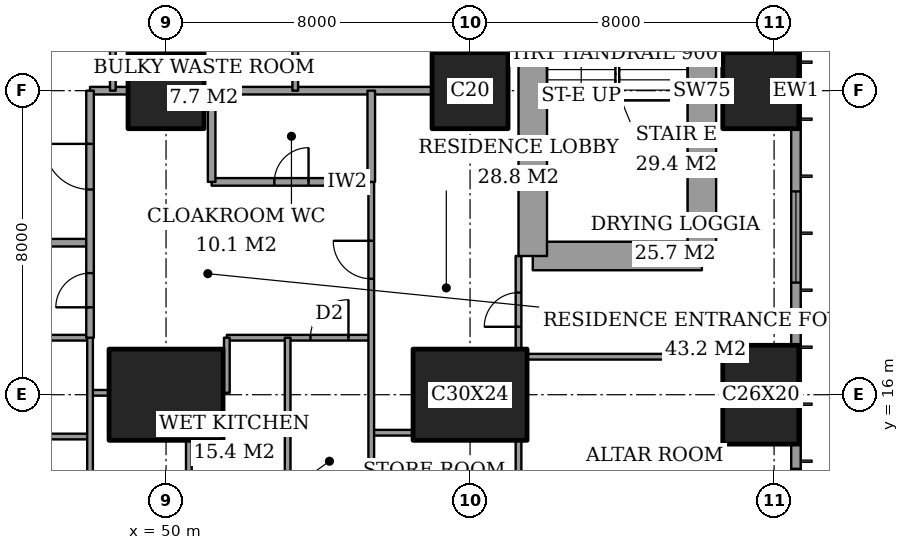
"""IFC4 building model, lengths in metres.
Left out: names, types, materials, properties, quantities, classifications, styles, units other than length and angle.
Written with IfcOpenShell. Run it as: python <this file> out.ifc"""

import sys

from ifc_helpers import new_model, si_unit, direction, frame, frame_2d, origin, origin_2d, place, context, subcontext, project, spatial, rectangle, extrude, element, fill, save


model = new_model("IFC4")
c1 = context("Model", 3, precision=1e-05, world=origin(), true_north=direction((0.0, 1.0)))
c2 = subcontext(c1, "Body", "Model", "MODEL_VIEW")
j1 = project(units=[si_unit("LENGTHUNIT", "METRE"), si_unit("PLANEANGLEUNIT", "RADIAN")], contexts=[c1])
p1 = place(None, origin())
s1 = spatial("IfcSite", under=j1, at=p1, CompositionType="ELEMENT")
p2 = place(p1, origin())
s2 = spatial("IfcBuilding", under=s1, at=p2, CompositionType="ELEMENT")
p3 = place(p2, frame((0.0, 0.0, 164.6)))
s3 = spatial("IfcBuildingStorey", under=s2, at=p3, CompositionType="ELEMENT", Elevation=164.6)
p4 = place(p3, frame((50.0, 16.0, 0.0), z_axis=(0.0, 0.0, 1.0), x_axis=(1.0, 0.0, 0.0)))
e1 = element("IfcColumn", 1, at=p4, inside=s3, PredefinedType="COLUMN", context=c2, shape_type="SweptSolid", body=[
    extrude(rectangle(XDim=3.0, YDim=2.4, at=origin_2d()), origin(), (0.0, 0.0, 1.0), 3.6),
])
p5 = place(p3, frame((50.0, 24.0, 0.0), z_axis=(0.0, 0.0, 1.0), x_axis=(1.0, 0.0, 0.0)))
e2 = element("IfcColumn", 2, at=p5, inside=s3, PredefinedType="COLUMN", context=c2, shape_type="SweptSolid", body=[
    extrude(rectangle(XDim=2.0, YDim=2.0, at=origin_2d()), origin(), (0.0, 0.0, 1.0), 3.6),
])
p6 = place(p3, frame((58.0, 16.0, 0.0), z_axis=(0.0, 0.0, 1.0), x_axis=(1.0, 0.0, 0.0)))
e3 = element("IfcColumn", 3, at=p6, inside=s3, PredefinedType="COLUMN", context=c2, shape_type="SweptSolid", body=[
    extrude(rectangle(XDim=3.0, YDim=2.4, at=origin_2d()), origin(), (0.0, 0.0, 1.0), 3.6),
])
p7 = place(p3, frame((58.0, 24.0, 0.0), z_axis=(0.0, 0.0, 1.0), x_axis=(1.0, 0.0, 0.0)))
e4 = element("IfcColumn", 4, at=p7, inside=s3, PredefinedType="COLUMN", context=c2, shape_type="SweptSolid", body=[
    extrude(rectangle(XDim=2.0, YDim=2.0, at=origin_2d()), origin(), (0.0, 0.0, 1.0), 3.6),
])
p8 = place(p3, frame((65.65, 16.0, 0.0), z_axis=(0.0, 0.0, 1.0), x_axis=(0.0, 1.0, 0.0)))
e5 = element("IfcColumn", 5, at=p8, inside=s3, PredefinedType="COLUMN", context=c2, shape_type="SweptSolid", body=[
    extrude(rectangle(XDim=2.6, YDim=2.0, at=origin_2d()), origin(), (0.0, 0.0, 1.0), 3.6),
])
p9 = place(p3, frame((65.65, 24.0, 0.0), z_axis=(0.0, 0.0, 1.0), x_axis=(1.0, 0.0, 0.0)))
e6 = element("IfcColumn", 6, at=p9, inside=s3, PredefinedType="COLUMN", context=c2, shape_type="SweptSolid", body=[
    extrude(rectangle(XDim=2.0, YDim=2.0, at=origin_2d()), origin(), (0.0, 0.0, 1.0), 3.6),
])
p10 = place(p3, frame((59.65, 19.65, 0.0), z_axis=(0.0, 0.0, 1.0), x_axis=(1.0, 0.0, 0.0)))
e7 = element("IfcWall", 7, at=p10, inside=s3, PredefinedType="SHEAR", context=c2, shape_type="SweptSolid", body=[
    extrude(rectangle(XDim=4.45, YDim=0.75, at=frame_2d((2.225, 0.0))), origin(), (0.0, 0.0, 1.0), 3.6),
])
p11 = place(p3, frame((64.1, 19.65, 0.0), z_axis=(0.0, 0.0, 1.0), x_axis=(0.0, 1.0, 0.0)))
e8 = element("IfcWall", 8, at=p11, inside=s3, PredefinedType="SHEAR", context=c2, shape_type="SweptSolid", body=[
    extrude(rectangle(XDim=8.7, YDim=0.75, at=frame_2d((4.35, 0.0))), origin(), (0.0, 0.0, 1.0), 3.6),
])
p12 = place(p3, frame((59.65, 28.35, 0.0), z_axis=(0.0, 0.0, 1.0), x_axis=(0.0, -1.0, 0.0)))
e9 = element("IfcWall", 9, at=p12, inside=s3, PredefinedType="SHEAR", context=c2, shape_type="SweptSolid", body=[
    extrude(rectangle(XDim=8.7, YDim=0.75, at=frame_2d((4.35, 0.0))), origin(), (0.0, 0.0, 1.0), 3.6),
])
p13 = place(p12, frame((0.975, 0.0, 0.0)))
e10 = element("IfcOpeningElement", 10, at=p13, cuts=e9, PredefinedType="OPENING", context=c2, shape_type="SweptSolid", body=[
    extrude(rectangle(XDim=1.0, YDim=2.1, at=frame_2d((0.5, 1.05))), frame((0.0, 0.385, 0.0), z_axis=(0.0, -1.0, 0.0), x_axis=(1.0, 0.0, 0.0)), (0.0, 0.0, 1.0), 0.77),
])
p14 = place(p3, frame((66.575, 3.175, 0.0), z_axis=(0.0, 0.0, 1.0), x_axis=(0.0, 1.0, 0.0)))
e11 = element("IfcWall", 11, at=p14, inside=s3, PredefinedType="SOLIDWALL", context=c2, shape_type="SweptSolid", body=[
    extrude(rectangle(XDim=41.65, YDim=0.25, at=frame_2d((20.825, 0.0))), origin(), (0.0, 0.0, 1.0), 3.6),
])
p15 = place(p14, frame((0.775, 0.0, 0.4)))
e12 = element("IfcOpeningElement", 12, at=p15, cuts=e11, PredefinedType="OPENING", context=c2, shape_type="SweptSolid", body=[
    extrude(rectangle(XDim=2.4, YDim=2.2, at=frame_2d((1.2, 1.1))), frame((0.0, 0.135, 0.0), z_axis=(0.0, -1.0, 0.0), x_axis=(1.0, 0.0, 0.0)), (0.0, 0.0, 1.0), 0.27),
])
p16 = place(p14, frame((6.225, 0.0, 0.4)))
e13 = element("IfcOpeningElement", 13, at=p16, cuts=e11, PredefinedType="OPENING", context=c2, shape_type="SweptSolid", body=[
    extrude(rectangle(XDim=1.2, YDim=2.2, at=frame_2d((0.6, 1.1))), frame((0.0, 0.135, 0.0), z_axis=(0.0, -1.0, 0.0), x_axis=(1.0, 0.0, 0.0)), (0.0, 0.0, 1.0), 0.27),
])
p17 = place(p14, frame((8.475, 0.0, 0.4)))
e14 = element("IfcOpeningElement", 14, at=p17, cuts=e11, PredefinedType="OPENING", context=c2, shape_type="SweptSolid", body=[
    extrude(rectangle(XDim=2.4, YDim=2.2, at=frame_2d((1.2, 1.1))), frame((0.0, 0.135, 0.0), z_axis=(0.0, -1.0, 0.0), x_axis=(1.0, 0.0, 0.0)), (0.0, 0.0, 1.0), 0.27),
])
p18 = place(p14, frame((15.775, 0.0, 0.4)))
e15 = element("IfcOpeningElement", 15, at=p18, cuts=e11, PredefinedType="OPENING", context=c2, shape_type="SweptSolid", body=[
    extrude(rectangle(XDim=2.4, YDim=2.2, at=frame_2d((1.2, 1.1))), frame((0.0, 0.135, 0.0), z_axis=(0.0, -1.0, 0.0), x_axis=(1.0, 0.0, 0.0)), (0.0, 0.0, 1.0), 0.27),
])
p19 = place(p14, frame((23.475, 0.0, 0.4)))
e16 = element("IfcOpeningElement", 16, at=p19, cuts=e11, PredefinedType="OPENING", context=c2, shape_type="SweptSolid", body=[
    extrude(rectangle(XDim=2.4, YDim=2.2, at=frame_2d((1.2, 1.1))), frame((0.0, 0.135, 0.0), z_axis=(0.0, -1.0, 0.0), x_axis=(1.0, 0.0, 0.0)), (0.0, 0.0, 1.0), 0.27),
])
p20 = place(p14, frame((30.975, 0.0, 0.4)))
e17 = element("IfcOpeningElement", 17, at=p20, cuts=e11, PredefinedType="OPENING", context=c2, shape_type="SweptSolid", body=[
    extrude(rectangle(XDim=2.4, YDim=2.2, at=frame_2d((1.2, 1.1))), frame((0.0, 0.135, 0.0), z_axis=(0.0, -1.0, 0.0), x_axis=(1.0, 0.0, 0.0)), (0.0, 0.0, 1.0), 0.27),
])
p21 = place(p14, frame((34.5, 0.0, 0.4)))
e18 = element("IfcOpeningElement", 18, at=p21, cuts=e11, PredefinedType="OPENING", context=c2, shape_type="SweptSolid", body=[
    extrude(rectangle(XDim=1.2, YDim=2.2, at=frame_2d((0.6, 1.1))), frame((0.0, 0.135, 0.0), z_axis=(0.0, -1.0, 0.0), x_axis=(1.0, 0.0, 0.0)), (0.0, 0.0, 1.0), 0.27),
])
p22 = place(p14, frame((38.475, 0.0, 0.4)))
e19 = element("IfcOpeningElement", 19, at=p22, cuts=e11, PredefinedType="OPENING", context=c2, shape_type="SweptSolid", body=[
    extrude(rectangle(XDim=2.4, YDim=2.2, at=frame_2d((1.2, 1.1))), frame((0.0, 0.135, 0.0), z_axis=(0.0, -1.0, 0.0), x_axis=(1.0, 0.0, 0.0)), (0.0, 0.0, 1.0), 0.27),
])
p23 = place(p3, frame((45.6, 14.9, 0.0), z_axis=(0.0, 0.0, 1.0), x_axis=(1.0, 0.0, 0.0)))
e20 = element("IfcWall", 20, at=p23, inside=s3, PredefinedType="PARTITIONING", context=c2, shape_type="SweptSolid", body=[
    extrude(rectangle(XDim=2.4, YDim=0.15, at=frame_2d((1.2, 0.0))), origin(), (0.0, 0.0, 1.0), 3.35),
])
p24 = place(p3, frame((55.4, 15.0, 0.0), z_axis=(0.0, 0.0, 1.0), x_axis=(1.0, 0.0, 0.0)))
e21 = element("IfcWall", 21, at=p24, inside=s3, PredefinedType="PARTITIONING", context=c2, shape_type="SweptSolid", body=[
    extrude(rectangle(XDim=1.1, YDim=0.15, at=frame_2d((0.55, 0.0))), origin(), (0.0, 0.0, 1.0), 3.35),
])
p25 = place(p3, frame((48.0, 16.05, 0.0), z_axis=(0.0, 0.0, 1.0), x_axis=(1.0, 0.0, 0.0)))
e22 = element("IfcWall", 22, at=p25, inside=s3, PredefinedType="PARTITIONING", context=c2, shape_type="SweptSolid", body=[
    extrude(rectangle(XDim=0.5, YDim=0.15, at=frame_2d((0.25, 0.0))), origin(), (0.0, 0.0, 1.0), 2.634),
])
p26 = place(p3, frame((59.5, 17.0, 0.0), z_axis=(0.0, 0.0, 1.0), x_axis=(1.0, 0.0, 0.0)))
e23 = element("IfcWall", 23, at=p26, inside=s3, PredefinedType="PARTITIONING", context=c2, shape_type="SweptSolid", body=[
    extrude(rectangle(XDim=5.15, YDim=0.15, at=frame_2d((2.575, 0.0))), origin(), (0.0, 0.0, 1.0), 3.35),
])
p27 = place(p3, frame((42.0, 17.5, 0.0), z_axis=(0.0, 0.0, 1.0), x_axis=(1.0, 0.0, 0.0)))
e24 = element("IfcWall", 24, at=p27, inside=s3, PredefinedType="PARTITIONING", context=c2, shape_type="SweptSolid", body=[
    extrude(rectangle(XDim=6.0, YDim=0.15, at=frame_2d((3.0, 0.0))), origin(), (0.0, 0.0, 1.0), 3.35),
])
p28 = place(p3, frame((51.6, 17.5, 0.0), z_axis=(0.0, 0.0, 1.0), x_axis=(1.0, 0.0, 0.0)))
e25 = element("IfcWall", 25, at=p28, inside=s3, PredefinedType="PARTITIONING", context=c2, shape_type="SweptSolid", body=[
    extrude(rectangle(XDim=3.8, YDim=0.15, at=frame_2d((1.9, 0.0))), origin(), (0.0, 0.0, 1.0), 3.35),
])
p29 = place(p28, frame((2.2, 0.0, 0.0)))
e26 = element("IfcOpeningElement", 26, at=p29, cuts=e25, PredefinedType="OPENING", context=c2, shape_type="SweptSolid", body=[
    extrude(rectangle(XDim=1.0, YDim=2.1, at=frame_2d((0.5, 1.05))), frame((0.0, 0.085, 0.0), z_axis=(0.0, -1.0, 0.0), x_axis=(1.0, 0.0, 0.0)), (0.0, 0.0, 1.0), 0.17),
])
p30 = place(p3, frame((42.0, 20.0, 0.0), z_axis=(0.0, 0.0, 1.0), x_axis=(1.0, 0.0, 0.0)))
e27 = element("IfcWall", 27, at=p30, inside=s3, PredefinedType="PARTITIONING", context=c2, shape_type="SweptSolid", body=[
    extrude(rectangle(XDim=6.0, YDim=0.2, at=frame_2d((3.0, 0.0))), origin(), (0.0, 0.0, 1.0), 3.35),
])
p31 = place(p3, frame((51.2, 21.6, 0.0), z_axis=(0.0, 0.0, 1.0), x_axis=(1.0, 0.0, 0.0)))
e28 = element("IfcWall", 28, at=p31, inside=s3, PredefinedType="PARTITIONING", context=c2, shape_type="SweptSolid", body=[
    extrude(rectangle(XDim=4.2, YDim=0.2, at=frame_2d((2.1, 0.0))), origin(), (0.0, 0.0, 1.0), 3.35),
])
p32 = place(p31, frame((1.65, 0.0, 0.0)))
e29 = element("IfcOpeningElement", 29, at=p32, cuts=e28, PredefinedType="OPENING", context=c2, shape_type="SweptSolid", body=[
    extrude(rectangle(XDim=0.9, YDim=2.1, at=frame_2d((0.45, 1.05))), frame((0.0, 0.11, 0.0), z_axis=(0.0, -1.0, 0.0), x_axis=(1.0, 0.0, 0.0)), (0.0, 0.0, 1.0), 0.22),
])
p33 = place(p3, frame((48.0, 24.0, 0.0), z_axis=(0.0, 0.0, 1.0), x_axis=(1.0, 0.0, 0.0)))
e30 = element("IfcWall", 30, at=p33, inside=s3, PredefinedType="PARTITIONING", context=c2, shape_type="SweptSolid", body=[
    extrude(rectangle(XDim=1.0, YDim=0.2, at=frame_2d((0.5, 0.0))), origin(), (0.0, 0.0, 1.0), 3.35),
])
p34 = place(p3, frame((51.0, 24.0, 0.0), z_axis=(0.0, 0.0, 1.0), x_axis=(1.0, 0.0, 0.0)))
e31 = element("IfcWall", 31, at=p34, inside=s3, PredefinedType="PARTITIONING", context=c2, shape_type="SweptSolid", body=[
    extrude(rectangle(XDim=6.0, YDim=0.2, at=frame_2d((3.0, 0.0))), origin(), (0.0, 0.0, 1.0), 3.35),
])
p35 = place(p3, frame((48.0, 17.5, 0.0), z_axis=(0.0, 0.0, 1.0), x_axis=(0.0, 1.0, 0.0)))
e32 = element("IfcWall", 32, at=p35, inside=s3, PredefinedType="PARTITIONING", context=c2, shape_type="SweptSolid", body=[
    extrude(rectangle(XDim=6.5, YDim=0.2, at=frame_2d((3.25, 0.0))), origin(), (0.0, 0.0, 1.0), 3.35),
])
p36 = place(p35, frame((3.9, 0.0, 0.0)))
e33 = element("IfcOpeningElement", 33, at=p36, cuts=e32, PredefinedType="OPENING", context=c2, shape_type="SweptSolid", body=[
    extrude(rectangle(XDim=1.2, YDim=2.4, at=frame_2d((0.6, 1.2))), frame((0.0, 0.11, 0.0), z_axis=(0.0, -1.0, 0.0), x_axis=(1.0, 0.0, 0.0)), (0.0, 0.0, 1.0), 0.22),
])
p37 = place(p35, frame((0.8, 0.0, 0.0)))
e34 = element("IfcOpeningElement", 34, at=p37, cuts=e32, PredefinedType="OPENING", context=c2, shape_type="SweptSolid", body=[
    extrude(rectangle(XDim=0.9, YDim=2.1, at=frame_2d((0.45, 1.05))), frame((0.0, 0.11, 0.0), z_axis=(0.0, -1.0, 0.0), x_axis=(1.0, 0.0, 0.0)), (0.0, 0.0, 1.0), 0.22),
])
p38 = place(p3, frame((48.0, 11.0, 0.0), z_axis=(0.0, 0.0, 1.0), x_axis=(0.0, 1.0, 0.0)))
e35 = element("IfcWall", 35, at=p38, inside=s3, PredefinedType="PARTITIONING", context=c2, shape_type="SweptSolid", body=[
    extrude(rectangle(XDim=6.5, YDim=0.15, at=frame_2d((3.25, 0.0))), origin(), (0.0, 0.0, 1.0), 3.35),
])
p39 = place(p3, frame((48.6, 24.0, 0.0), z_axis=(0.0, 0.0, 1.0), x_axis=(0.0, 1.0, 0.0)))
e36 = element("IfcWall", 36, at=p39, inside=s3, PredefinedType="PARTITIONING", context=c2, shape_type="SweptSolid", body=[
    extrude(rectangle(XDim=1.6, YDim=0.15, at=frame_2d((0.8, 0.0))), origin(), (0.0, 0.0, 1.0), 3.35),
])
p40 = place(p3, frame((50.6, 11.0, 0.0), z_axis=(0.0, 0.0, 1.0), x_axis=(0.0, 1.0, 0.0)))
e37 = element("IfcWall", 37, at=p40, inside=s3, PredefinedType="PARTITIONING", context=c2, shape_type="SweptSolid", body=[
    extrude(rectangle(XDim=3.8, YDim=0.15, at=frame_2d((1.9, 0.0))), origin(), (0.0, 0.0, 1.0), 3.35),
])
p41 = place(p3, frame((51.2, 21.6, 0.0), z_axis=(0.0, 0.0, 1.0), x_axis=(0.0, 1.0, 0.0)))
e38 = element("IfcWall", 38, at=p41, inside=s3, PredefinedType="PARTITIONING", context=c2, shape_type="SweptSolid", body=[
    extrude(rectangle(XDim=2.4, YDim=0.2, at=frame_2d((1.2, 0.0))), origin(), (0.0, 0.0, 1.0), 3.35),
])
p42 = place(p3, frame((51.6, 16.05, 0.0), z_axis=(0.0, 0.0, 1.0), x_axis=(0.0, 1.0, 0.0)))
e39 = element("IfcWall", 39, at=p42, inside=s3, PredefinedType="PARTITIONING", context=c2, shape_type="SweptSolid", body=[
    extrude(rectangle(XDim=1.45, YDim=0.15, at=frame_2d((0.725, 0.0))), origin(), (0.0, 0.0, 1.0), 3.35),
])
p43 = place(p3, frame((53.2, 11.0, 0.0), z_axis=(0.0, 0.0, 1.0), x_axis=(0.0, 1.0, 0.0)))
e40 = element("IfcWall", 40, at=p43, inside=s3, PredefinedType="PARTITIONING", context=c2, shape_type="SweptSolid", body=[
    extrude(rectangle(XDim=6.5, YDim=0.15, at=frame_2d((3.25, 0.0))), origin(), (0.0, 0.0, 1.0), 3.35),
])
p44 = place(p3, frame((53.4, 24.0, 0.0), z_axis=(0.0, 0.0, 1.0), x_axis=(0.0, 1.0, 0.0)))
e41 = element("IfcWall", 41, at=p44, inside=s3, PredefinedType="PARTITIONING", context=c2, shape_type="SweptSolid", body=[
    extrude(rectangle(XDim=1.6, YDim=0.15, at=frame_2d((0.8, 0.0))), origin(), (0.0, 0.0, 1.0), 3.35),
])
p45 = place(p3, frame((55.4, 21.6, 0.0), z_axis=(0.0, 0.0, 1.0), x_axis=(0.0, 1.0, 0.0)))
e42 = element("IfcWall", 42, at=p45, inside=s3, PredefinedType="PARTITIONING", context=c2, shape_type="SweptSolid", body=[
    extrude(rectangle(XDim=2.4, YDim=0.2, at=frame_2d((1.2, 0.0))), origin(), (0.0, 0.0, 1.0), 3.35),
])
p46 = place(p3, frame((55.4, 11.0, 0.0), z_axis=(0.0, 0.0, 1.0), x_axis=(0.0, 1.0, 0.0)))
e43 = element("IfcWall", 43, at=p46, inside=s3, PredefinedType="PARTITIONING", context=c2, shape_type="SweptSolid", body=[
    extrude(rectangle(XDim=10.6, YDim=0.15, at=frame_2d((5.3, 0.0))), origin(), (0.0, 0.0, 1.0), 3.35),
])
p47 = place(p46, frame((8.05, 0.0, 0.0)))
e44 = element("IfcOpeningElement", 44, at=p47, cuts=e43, PredefinedType="OPENING", context=c2, shape_type="SweptSolid", body=[
    extrude(rectangle(XDim=1.0, YDim=2.1, at=frame_2d((0.5, 1.05))), frame((0.0, 0.085, 0.0), z_axis=(0.0, -1.0, 0.0), x_axis=(1.0, 0.0, 0.0)), (0.0, 0.0, 1.0), 0.17),
])
p48 = place(p3, frame((59.275, 11.0, 0.0), z_axis=(0.0, 0.0, 1.0), x_axis=(0.0, 1.0, 0.0)))
e45 = element("IfcWall", 45, at=p48, inside=s3, PredefinedType="PARTITIONING", context=c2, shape_type="SweptSolid", body=[
    extrude(rectangle(XDim=3.8, YDim=0.15, at=frame_2d((1.9, 0.0))), origin(), (0.0, 0.0, 1.0), 3.35),
])
p49 = place(p3, frame((59.275, 17.2, 0.0), z_axis=(0.0, 0.0, 1.0), x_axis=(0.0, 1.0, 0.0)))
e46 = element("IfcWall", 46, at=p49, inside=s3, PredefinedType="PARTITIONING", context=c2, shape_type="SweptSolid", body=[
    extrude(rectangle(XDim=2.45, YDim=0.15, at=frame_2d((1.225, 0.0))), origin(), (0.0, 0.0, 1.0), 3.35),
])
p50 = place(p49, frame((0.587, 0.0, 0.0)))
e47 = element("IfcOpeningElement", 47, at=p50, cuts=e46, PredefinedType="OPENING", context=c2, shape_type="SweptSolid", body=[
    extrude(rectangle(XDim=0.9, YDim=2.1, at=frame_2d((0.45, 1.05))), frame((0.0, 0.085, 0.0), z_axis=(0.0, -1.0, 0.0), x_axis=(1.0, 0.0, 0.0)), (0.0, 0.0, 1.0), 0.17),
])
p51 = place(p17, origin())
e48 = element("IfcWindow", 48, at=p51, inside=s3, PartitioningType="SINGLE_PANEL", PredefinedType="WINDOW", context=c2, shape_type="SweptSolid", body=[
    extrude(rectangle(XDim=2.4, YDim=2.2, at=frame_2d((1.2, 1.1))), frame((0.0, 0.03, 0.0), z_axis=(0.0, -1.0, 0.0), x_axis=(1.0, 0.0, 0.0)), (0.0, 0.0, 1.0), 0.06),
])
fill(e14, e48)
p52 = place(p18, origin())
e49 = element("IfcWindow", 49, at=p52, inside=s3, PartitioningType="SINGLE_PANEL", PredefinedType="WINDOW", context=c2, shape_type="SweptSolid", body=[
    extrude(rectangle(XDim=2.4, YDim=2.2, at=frame_2d((1.2, 1.1))), frame((0.0, 0.03, 0.0), z_axis=(0.0, -1.0, 0.0), x_axis=(1.0, 0.0, 0.0)), (0.0, 0.0, 1.0), 0.06),
])
fill(e15, e49)
p53 = place(p50, origin())
e50 = element("IfcDoor", 50, at=p53, inside=s3, OperationType="SINGLE_SWING_RIGHT", PredefinedType="DOOR", context=c2, shape_type="SweptSolid", body=[
    extrude(rectangle(XDim=0.9, YDim=2.1, at=frame_2d((0.45, 1.05))), frame((0.0, 0.025, 0.0), z_axis=(0.0, -1.0, 0.0), x_axis=(1.0, 0.0, 0.0)), (0.0, 0.0, 1.0), 0.05),
])
fill(e47, e50)
p54 = place(p47, origin())
e51 = element("IfcDoor", 51, at=p54, inside=s3, OperationType="SINGLE_SWING_LEFT", PredefinedType="DOOR", context=c2, shape_type="SweptSolid", body=[
    extrude(rectangle(XDim=1.0, YDim=2.1, at=frame_2d((0.5, 1.05))), frame((0.0, 0.025, 0.0), z_axis=(0.0, -1.0, 0.0), x_axis=(1.0, 0.0, 0.0)), (0.0, 0.0, 1.0), 0.05),
])
fill(e44, e51)
p55 = place(p32, origin())
e52 = element("IfcDoor", 52, at=p55, inside=s3, OperationType="SINGLE_SWING_LEFT", PredefinedType="DOOR", context=c2, shape_type="SweptSolid", body=[
    extrude(rectangle(XDim=0.9, YDim=2.1, at=frame_2d((0.45, 1.05))), frame((0.0, 0.025, 0.0), z_axis=(0.0, -1.0, 0.0), x_axis=(1.0, 0.0, 0.0)), (0.0, 0.0, 1.0), 0.05),
])
fill(e29, e52)
p56 = place(p36, origin())
e53 = element("IfcDoor", 53, at=p56, inside=s3, OperationType="SINGLE_SWING_LEFT", PredefinedType="DOOR", context=c2, shape_type="SweptSolid", body=[
    extrude(rectangle(XDim=1.2, YDim=2.4, at=frame_2d((0.6, 1.2))), frame((0.0, 0.025, 0.0), z_axis=(0.0, -1.0, 0.0), x_axis=(1.0, 0.0, 0.0)), (0.0, 0.0, 1.0), 0.05),
])
fill(e33, e53)
p57 = place(p29, origin())
e54 = element("IfcDoor", 54, at=p57, inside=s3, OperationType="SINGLE_SWING_LEFT", PredefinedType="DOOR", context=c2, shape_type="SweptSolid", body=[
    extrude(rectangle(XDim=1.0, YDim=2.1, at=frame_2d((0.5, 1.05))), frame((0.0, 0.025, 0.0), z_axis=(0.0, -1.0, 0.0), x_axis=(1.0, 0.0, 0.0)), (0.0, 0.0, 1.0), 0.05),
])
fill(e26, e54)
p58 = place(p37, origin())
e55 = element("IfcDoor", 55, at=p58, inside=s3, OperationType="SINGLE_SWING_RIGHT", PredefinedType="DOOR", context=c2, shape_type="SweptSolid", body=[
    extrude(rectangle(XDim=0.9, YDim=2.1, at=frame_2d((0.45, 1.05))), frame((0.0, 0.025, 0.0), z_axis=(0.0, -1.0, 0.0), x_axis=(1.0, 0.0, 0.0)), (0.0, 0.0, 1.0), 0.05),
])
fill(e34, e55)
save(model, sys.argv[1])
